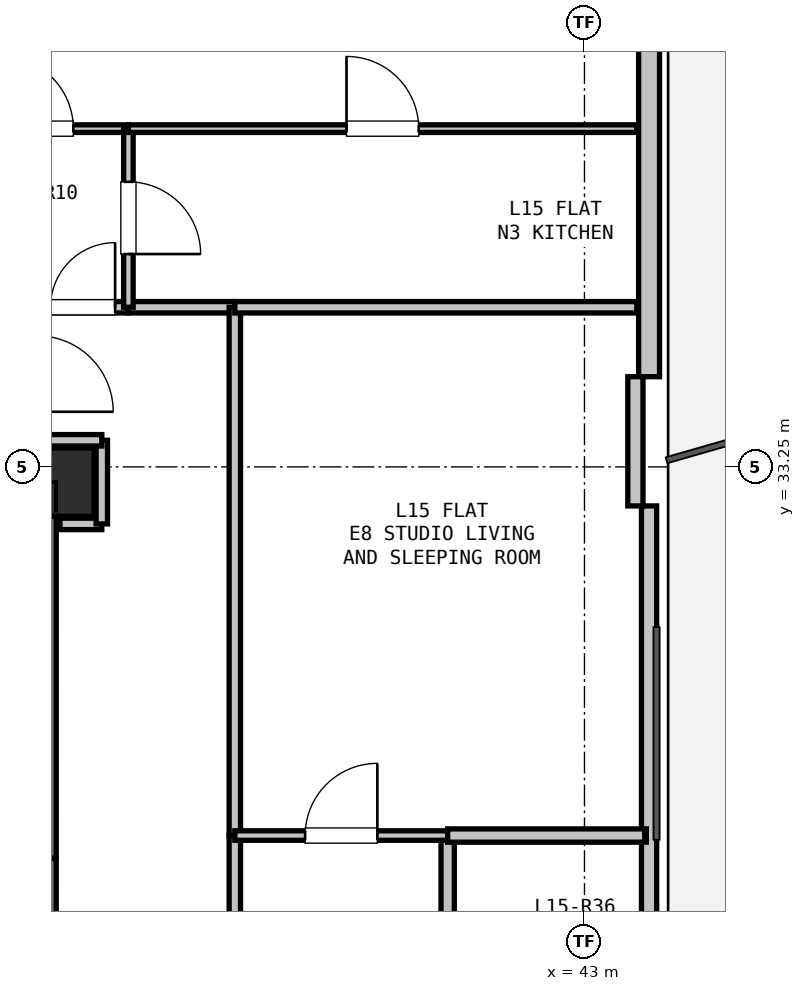
"""IFC4 building model, lengths in metres.
Left out: names, types, materials, properties, quantities, classifications, styles, units other than length and angle.
Written with IfcOpenShell. Run it as: python <this file> out.ifc"""

import sys

from ifc_helpers import new_model, si_unit, direction, frame, frame_2d, origin, origin_2d, place, context, subcontext, project, spatial, rectangle, extrude, element, fill, save


model = new_model("IFC4")
c1 = context("Model", 3, precision=1e-05, world=origin(), true_north=direction((0.0, 1.0)))
c2 = subcontext(c1, "Body", "Model", "MODEL_VIEW")
j1 = project(units=[si_unit("LENGTHUNIT", "METRE"), si_unit("PLANEANGLEUNIT", "RADIAN")], contexts=[c1])
p1 = place(None, origin())
s1 = spatial("IfcSite", under=j1, at=p1, CompositionType="ELEMENT")
p2 = place(p1, origin())
s2 = spatial("IfcBuilding", under=s1, at=p2, CompositionType="ELEMENT")
p3 = place(p2, frame((0.0, 0.0, 55.5)))
s3 = spatial("IfcBuildingStorey", under=s2, at=p3, CompositionType="ELEMENT", Elevation=55.5)
p4 = place(p3, frame((36.1, 33.05, 0.0), z_axis=(0.0, 0.0, 1.0), x_axis=(1.0, 0.0, 0.0)))
e1 = element("IfcColumn", 1, at=p4, inside=s3, PredefinedType="COLUMN", context=c2, shape_type="SweptSolid", body=[
    extrude(rectangle(XDim=0.9, YDim=0.9, at=origin_2d()), origin(), (0.0, 0.0, 1.0), 3.3),
])
p5 = place(p3, frame((43.85, 47.11, 0.0), z_axis=(0.0, 0.0, 1.0), x_axis=(0.0, -1.0, 0.0)))
e2 = element("IfcWall", 2, at=p5, inside=s3, PredefinedType="SOLIDWALL", context=c2, shape_type="SweptSolid", body=[
    extrude(rectangle(XDim=12.673, YDim=0.275, at=frame_2d((6.336, 0.0))), origin(), (0.0, 0.0, 1.0), 2.66),
])
p6 = place(p5, frame((2.325, 0.0, 0.0)))
e3 = element("IfcOpeningElement", 3, at=p6, cuts=e2, PredefinedType="OPENING", context=c2, shape_type="SweptSolid", body=[
    extrude(rectangle(XDim=1.1, YDim=2.1, at=frame_2d((0.55, 1.05))), frame((0.0, 0.147, 0.0), z_axis=(0.0, -1.0, 0.0), x_axis=(1.0, 0.0, 0.0)), (0.0, 0.0, 1.0), 0.295),
])
p7 = place(p3, frame((43.85, 32.737, 0.0), z_axis=(0.0, 0.0, 1.0), x_axis=(0.0, -1.0, 0.0)))
e4 = element("IfcWall", 4, at=p7, inside=s3, PredefinedType="PARAPET", context=c2, shape_type="SweptSolid", body=[
    extrude(rectangle(XDim=11.973, YDim=0.2, at=frame_2d((5.987, 0.0))), origin(), (0.0, 0.0, 1.0), 0.2),
])
p8 = place(p3, frame((43.67, 34.437, 0.0), z_axis=(0.0, 0.0, 1.0), x_axis=(0.0, -1.0, 0.0)))
e5 = element("IfcWall", 5, at=p8, inside=s3, PredefinedType="PARAPET", context=c2, shape_type="SweptSolid", body=[
    extrude(rectangle(XDim=1.7, YDim=0.2, at=frame_2d((0.85, 0.0))), origin(), (0.0, 0.0, 1.0), 2.66),
])
p9 = place(p3, frame((35.8, 32.75, 0.0), z_axis=(0.0, 0.0, 1.0), x_axis=(0.0, -1.0, 0.0)))
e6 = element("IfcWall", 6, at=p9, inside=s3, PredefinedType="SHEAR", context=c2, shape_type="SweptSolid", body=[
    extrude(rectangle(XDim=4.65, YDim=0.5, at=frame_2d((2.325, 0.0))), origin(), (0.0, 0.0, 1.0), 3.04),
])
p10 = place(p3, frame((35.8, 28.1, 0.0), z_axis=(0.0, 0.0, 1.0), x_axis=(0.0, -1.0, 0.0)))
e7 = element("IfcWall", 7, at=p10, inside=s3, PredefinedType="SHEAR", context=c2, shape_type="SweptSolid", body=[
    extrude(rectangle(XDim=7.35, YDim=0.5, at=frame_2d((3.675, 0.0))), origin(), (0.0, 0.0, 1.0), 3.04),
])
p11 = place(p3, frame((36.1, 32.5, 0.0), z_axis=(0.0, 0.0, 1.0), x_axis=(1.0, 0.0, 0.0)))
e8 = element("IfcWall", 8, at=p11, inside=s3, PredefinedType="PARTITIONING", context=c2, shape_type="SweptSolid", body=[
    extrude(rectangle(XDim=0.55, YDim=0.15, at=frame_2d((0.275, 0.0))), origin(), (0.0, 0.0, 1.0), 2.488),
])
p12 = place(p3, frame((36.65, 32.5, 0.0), z_axis=(0.0, 0.0, 1.0), x_axis=(0.0, 1.0, 0.0)))
e9 = element("IfcWall", 9, at=p12, inside=s3, PredefinedType="PARTITIONING", context=c2, shape_type="SweptSolid", body=[
    extrude(rectangle(XDim=1.1, YDim=0.15, at=frame_2d((0.55, 0.0))), origin(), (0.0, 0.0, 1.0), 2.337),
])
p13 = place(p3, frame((36.65, 33.6, 0.0), z_axis=(0.0, 0.0, 1.0), x_axis=(-1.0, 0.0, 0.0)))
e10 = element("IfcWall", 10, at=p13, inside=s3, PredefinedType="PARTITIONING", context=c2, shape_type="SweptSolid", body=[
    extrude(rectangle(XDim=0.85, YDim=0.15, at=frame_2d((0.425, 0.0))), origin(), (0.0, 0.0, 1.0), 2.337),
])
p14 = place(p3, frame((35.8, 35.35, 0.0), z_axis=(0.0, 0.0, 1.0), x_axis=(1.0, 0.0, 0.0)))
e11 = element("IfcWall", 11, at=p14, inside=s3, PredefinedType="PARTITIONING", context=c2, shape_type="SweptSolid", body=[
    extrude(rectangle(XDim=1.2, YDim=0.15, at=frame_2d((0.6, 0.0))), origin(), (0.0, 0.0, 1.0), 2.337),
])
p15 = place(p14, frame((0.175, 0.0, 0.0)))
e12 = element("IfcOpeningElement", 12, at=p15, cuts=e11, PredefinedType="OPENING", context=c2, shape_type="SweptSolid", body=[
    extrude(rectangle(XDim=0.85, YDim=2.1, at=frame_2d((0.425, 1.05))), frame((0.0, 0.085, 0.0), z_axis=(0.0, -1.0, 0.0), x_axis=(1.0, 0.0, 0.0)), (0.0, 0.0, 1.0), 0.17),
])
p16 = place(p3, frame((37.0, 35.35, 0.0), z_axis=(0.0, 0.0, 1.0), x_axis=(1.0, 0.0, 0.0)))
e13 = element("IfcWall", 13, at=p16, inside=s3, PredefinedType="PARTITIONING", context=c2, shape_type="SweptSolid", body=[
    extrude(rectangle(XDim=1.4, YDim=0.15, at=frame_2d((0.7, 0.0))), origin(), (0.0, 0.0, 1.0), 2.337),
])
p17 = place(p3, frame((38.4, 35.35, 0.0), z_axis=(0.0, 0.0, 1.0), x_axis=(0.0, -1.0, 0.0)))
e14 = element("IfcWall", 14, at=p17, inside=s3, PredefinedType="PARTITIONING", context=c2, shape_type="SweptSolid", body=[
    extrude(rectangle(XDim=6.95, YDim=0.15, at=frame_2d((3.475, 0.0))), origin(), (0.0, 0.0, 1.0), 2.337),
])
p18 = place(p3, frame((38.4, 28.4, 0.0), z_axis=(0.0, 0.0, 1.0), x_axis=(0.0, -1.0, 0.0)))
e15 = element("IfcWall", 15, at=p18, inside=s3, PredefinedType="PARTITIONING", context=c2, shape_type="SweptSolid", body=[
    extrude(rectangle(XDim=3.2, YDim=0.15, at=frame_2d((1.6, 0.0))), origin(), (0.0, 0.0, 1.0), 3.04),
])
p19 = place(p18, frame((1.1, 0.0, 0.0)))
e16 = element("IfcOpeningElement", 16, at=p19, cuts=e15, PredefinedType="OPENING", context=c2, shape_type="SweptSolid", body=[
    extrude(rectangle(XDim=1.0, YDim=2.15, at=frame_2d((0.5, 1.075))), frame((0.0, 0.085, 0.0), z_axis=(0.0, -1.0, 0.0), x_axis=(1.0, 0.0, 0.0)), (0.0, 0.0, 1.0), 0.17),
])
p20 = place(p3, frame((34.6, 37.7, 0.0), z_axis=(0.0, 0.0, 1.0), x_axis=(1.0, 0.0, 0.0)))
e17 = element("IfcWall", 17, at=p20, inside=s3, PredefinedType="PARTITIONING", context=c2, shape_type="SweptSolid", body=[
    extrude(rectangle(XDim=2.4, YDim=0.1, at=frame_2d((1.2, 0.0))), origin(), (0.0, 0.0, 1.0), 2.337),
])
p21 = place(p20, frame((0.725, 0.0, 0.0)))
e18 = element("IfcOpeningElement", 18, at=p21, cuts=e17, PredefinedType="OPENING", context=c2, shape_type="SweptSolid", body=[
    extrude(rectangle(XDim=0.95, YDim=2.1, at=frame_2d((0.475, 1.05))), frame((0.0, 0.06, 0.0), z_axis=(0.0, -1.0, 0.0), x_axis=(1.0, 0.0, 0.0)), (0.0, 0.0, 1.0), 0.12),
])
p22 = place(p3, frame((37.0, 37.7, 0.0), z_axis=(0.0, 0.0, 1.0), x_axis=(0.0, -1.0, 0.0)))
e19 = element("IfcWall", 19, at=p22, inside=s3, PredefinedType="PARTITIONING", context=c2, shape_type="SweptSolid", body=[
    extrude(rectangle(XDim=2.35, YDim=0.125, at=frame_2d((1.175, 0.0))), origin(), (0.0, 0.0, 1.0), 2.337),
])
p23 = place(p22, frame((0.7, 0.0, 0.0)))
e20 = element("IfcOpeningElement", 20, at=p23, cuts=e19, PredefinedType="OPENING", context=c2, shape_type="SweptSolid", body=[
    extrude(rectangle(XDim=0.95, YDim=2.1, at=frame_2d((0.475, 1.05))), frame((0.0, 0.073, 0.0), z_axis=(0.0, -1.0, 0.0), x_axis=(1.0, 0.0, 0.0)), (0.0, 0.0, 1.0), 0.145),
])
p24 = place(p3, frame((41.2, 28.4, 0.0), z_axis=(0.0, 0.0, 1.0), x_axis=(0.0, -1.0, 0.0)))
e21 = element("IfcWall", 21, at=p24, inside=s3, PredefinedType="PLUMBINGWALL", context=c2, shape_type="SweptSolid", body=[
    extrude(rectangle(XDim=3.2, YDim=0.175, at=frame_2d((1.6, 0.0))), origin(), (0.0, 0.0, 1.0), 3.04),
])
p25 = place(p24, frame((1.15, 0.0, 0.0)))
e22 = element("IfcOpeningElement", 22, at=p25, cuts=e21, PredefinedType="OPENING", context=c2, shape_type="SweptSolid", body=[
    extrude(rectangle(XDim=0.9, YDim=2.1, at=frame_2d((0.45, 1.05))), frame((0.0, 0.097, 0.0), z_axis=(0.0, -1.0, 0.0), x_axis=(1.0, 0.0, 0.0)), (0.0, 0.0, 1.0), 0.195),
])
p26 = place(p3, frame((38.4, 28.4, 0.0), z_axis=(0.0, 0.0, 1.0), x_axis=(1.0, 0.0, 0.0)))
e23 = element("IfcWall", 23, at=p26, inside=s3, PredefinedType="PARTITIONING", context=c2, shape_type="SweptSolid", body=[
    extrude(rectangle(XDim=2.8, YDim=0.125, at=frame_2d((1.4, 0.0))), origin(), (0.0, 0.0, 1.0), 3.04),
])
p27 = place(p26, frame((0.925, 0.0, 0.0)))
e24 = element("IfcOpeningElement", 24, at=p27, cuts=e23, PredefinedType="OPENING", context=c2, shape_type="SweptSolid", body=[
    extrude(rectangle(XDim=0.95, YDim=2.1, at=frame_2d((0.475, 1.05))), frame((0.0, 0.073, 0.0), z_axis=(0.0, -1.0, 0.0), x_axis=(1.0, 0.0, 0.0)), (0.0, 0.0, 1.0), 0.145),
])
p28 = place(p3, frame((43.688, 35.35, 0.0), z_axis=(0.0, 0.0, 1.0), x_axis=(-1.0, 0.0, 0.0)))
e25 = element("IfcWall", 25, at=p28, inside=s3, PredefinedType="PARTITIONING", context=c2, shape_type="SweptSolid", body=[
    extrude(rectangle(XDim=5.289, YDim=0.15, at=frame_2d((2.644, 0.0))), origin(), (0.0, 0.0, 1.0), 2.337),
])
p29 = place(p3, frame((37.0, 37.7, 0.0), z_axis=(0.0, 0.0, 1.0), x_axis=(1.0, 0.0, 0.0)))
e26 = element("IfcWall", 26, at=p29, inside=s3, PredefinedType="PARTITIONING", context=c2, shape_type="SweptSolid", body=[
    extrude(rectangle(XDim=6.688, YDim=0.1, at=frame_2d((3.344, 0.0))), origin(), (0.0, 0.0, 1.0), 2.337),
])
p30 = place(p29, frame((2.869, 0.0, 0.0)))
e27 = element("IfcOpeningElement", 27, at=p30, cuts=e26, PredefinedType="OPENING", context=c2, shape_type="SweptSolid", body=[
    extrude(rectangle(XDim=0.95, YDim=2.1, at=frame_2d((0.475, 1.05))), frame((0.0, 0.06, 0.0), z_axis=(0.0, -1.0, 0.0), x_axis=(1.0, 0.0, 0.0)), (0.0, 0.0, 1.0), 0.12),
])
p31 = place(p3, frame((41.2, 28.4, 0.0), z_axis=(0.0, 0.0, 1.0), x_axis=(1.0, 0.0, 0.0)))
e28 = element("IfcWall", 28, at=p31, inside=s3, PredefinedType="PLUMBINGWALL", context=c2, shape_type="SweptSolid", body=[
    extrude(rectangle(XDim=2.614, YDim=0.175, at=frame_2d((1.307, 0.0))), origin(), (0.0, 0.0, 1.0), 2.365),
])
p32 = place(p15, origin())
e29 = element("IfcDoor", 29, at=p32, inside=s3, OperationType="SINGLE_SWING_RIGHT", PredefinedType="DOOR", context=c2, shape_type="SweptSolid", body=[
    extrude(rectangle(XDim=0.85, YDim=2.1, at=frame_2d((0.425, 1.05))), frame((0.0, 0.025, 0.0), z_axis=(0.0, -1.0, 0.0), x_axis=(1.0, 0.0, 0.0)), (0.0, 0.0, 1.0), 0.05),
])
fill(e12, e29)
p33 = place(p23, origin())
e30 = element("IfcDoor", 30, at=p33, inside=s3, OperationType="SINGLE_SWING_RIGHT", PredefinedType="DOOR", context=c2, shape_type="SweptSolid", body=[
    extrude(rectangle(XDim=0.95, YDim=2.1, at=frame_2d((0.475, 1.05))), frame((0.0, 0.025, 0.0), z_axis=(0.0, -1.0, 0.0), x_axis=(1.0, 0.0, 0.0)), (0.0, 0.0, 1.0), 0.05),
])
fill(e20, e30)
p34 = place(p21, origin())
e31 = element("IfcDoor", 31, at=p34, inside=s3, OperationType="SINGLE_SWING_LEFT", PredefinedType="DOOR", context=c2, shape_type="SweptSolid", body=[
    extrude(rectangle(XDim=0.95, YDim=2.1, at=frame_2d((0.475, 1.05))), frame((0.0, 0.025, 0.0), z_axis=(0.0, -1.0, 0.0), x_axis=(1.0, 0.0, 0.0)), (0.0, 0.0, 1.0), 0.05),
])
fill(e18, e31)
p35 = place(p27, origin())
e32 = element("IfcDoor", 32, at=p35, inside=s3, OperationType="SINGLE_SWING_RIGHT", PredefinedType="DOOR", context=c2, shape_type="SweptSolid", body=[
    extrude(rectangle(XDim=0.95, YDim=2.1, at=frame_2d((0.475, 1.05))), frame((0.0, 0.025, 0.0), z_axis=(0.0, -1.0, 0.0), x_axis=(1.0, 0.0, 0.0)), (0.0, 0.0, 1.0), 0.05),
])
fill(e24, e32)
p36 = place(p30, origin())
e33 = element("IfcDoor", 33, at=p36, inside=s3, OperationType="SINGLE_SWING_LEFT", PredefinedType="DOOR", context=c2, shape_type="SweptSolid", body=[
    extrude(rectangle(XDim=0.95, YDim=2.1, at=frame_2d((0.475, 1.05))), frame((0.0, 0.025, 0.0), z_axis=(0.0, -1.0, 0.0), x_axis=(1.0, 0.0, 0.0)), (0.0, 0.0, 1.0), 0.05),
])
fill(e27, e33)
save(model, sys.argv[1])
